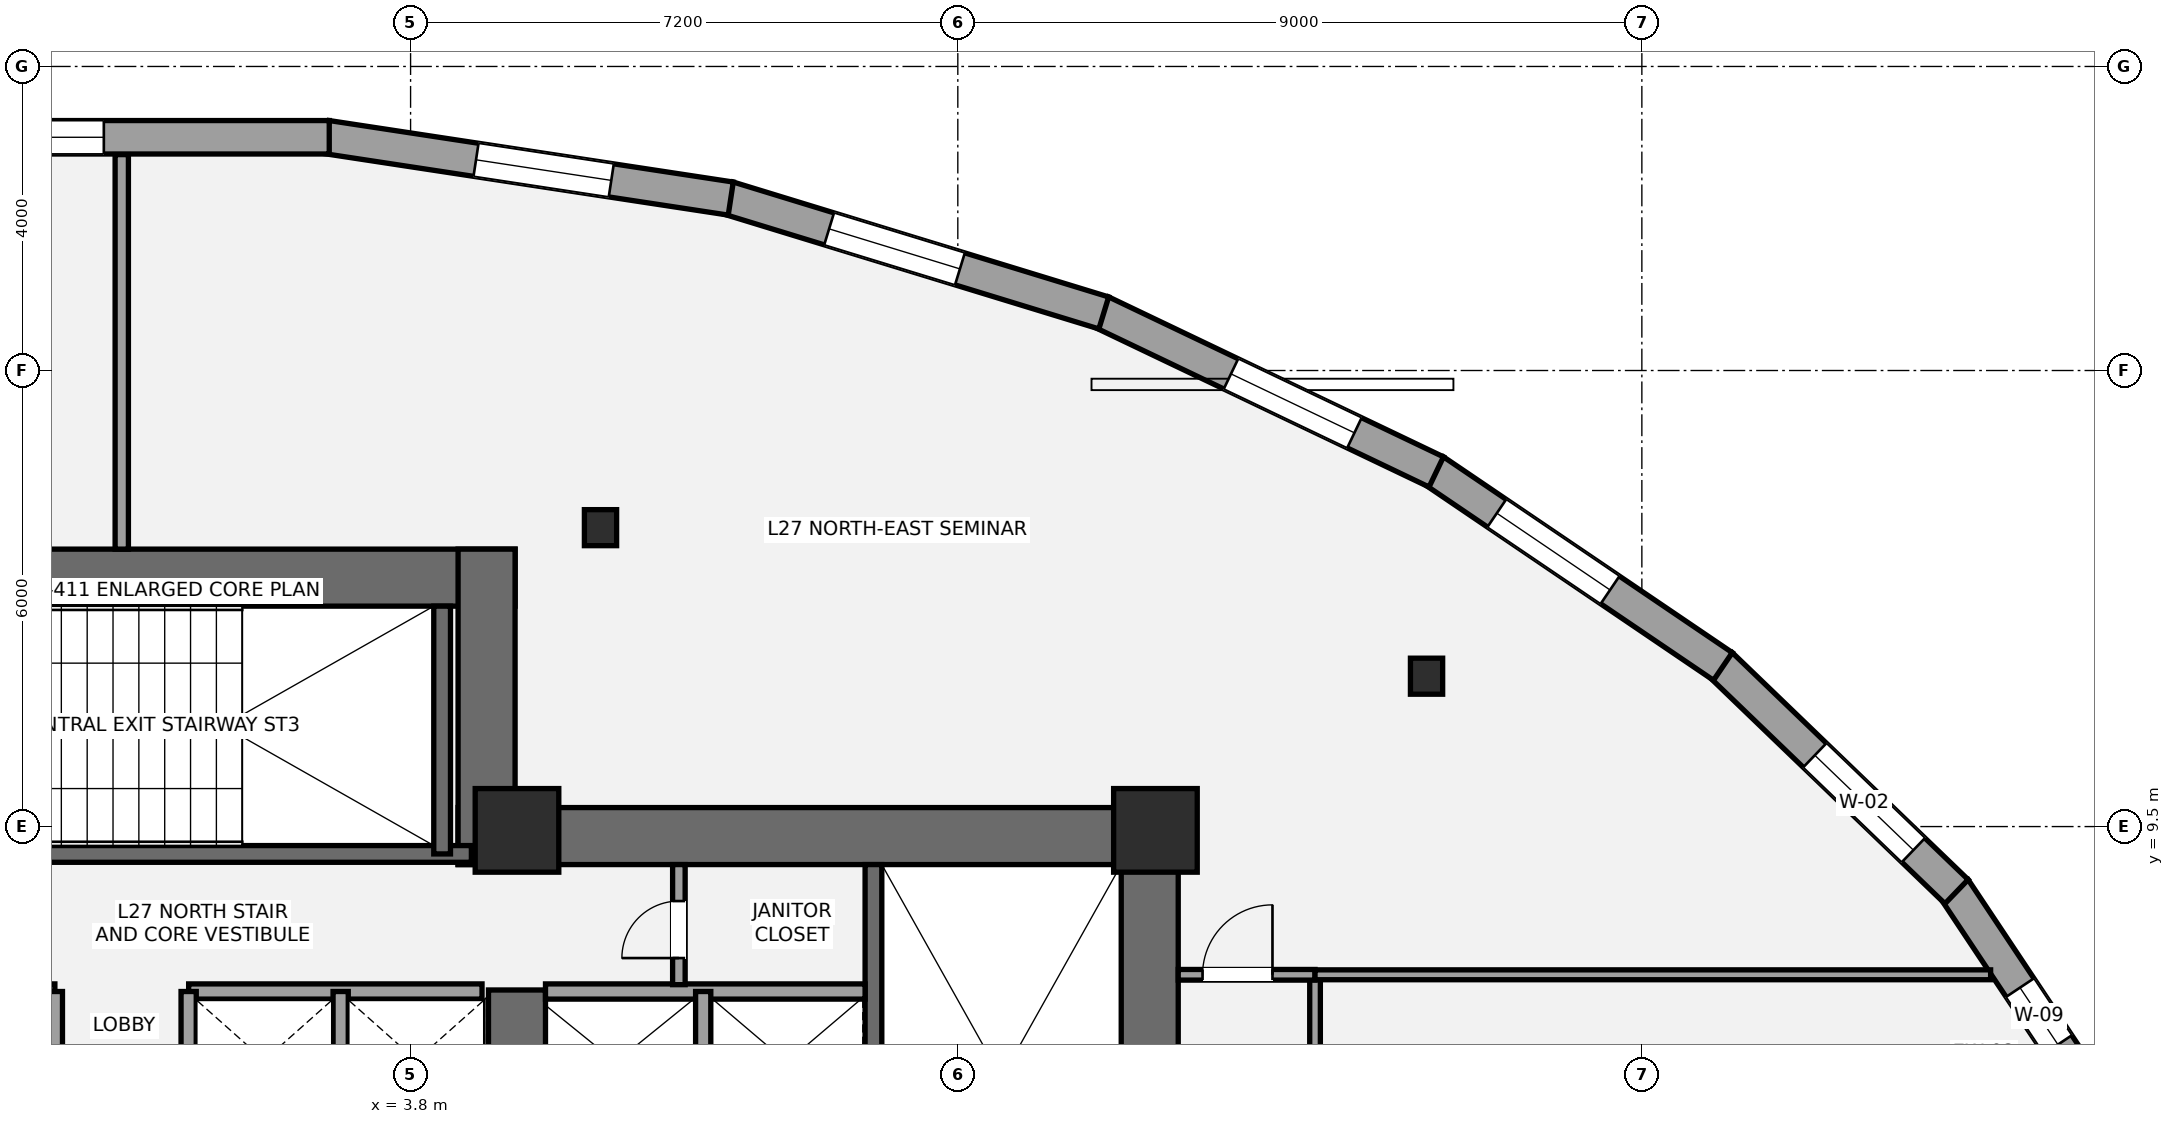
"""IFC4 building model, lengths in metres.
Left out: names, types, materials, properties, quantities, classifications, styles, units other than length and angle.
Written with IfcOpenShell. Run it as: python <this file> out.ifc"""

import sys

from ifc_helpers import new_model, si_unit, direction, frame, frame_2d, origin, origin_2d, place, context, subcontext, project, spatial, rectangle, i_section, extrude, element, fill, save


model = new_model("IFC4")
c1 = context("Model", 3, precision=1e-05, world=origin(), true_north=direction((0.0, 1.0)))
c2 = subcontext(c1, "Body", "Model", "MODEL_VIEW")
j1 = project(units=[si_unit("LENGTHUNIT", "METRE"), si_unit("PLANEANGLEUNIT", "RADIAN")], contexts=[c1])
p1 = place(None, origin())
s1 = spatial("IfcSite", under=j1, at=p1, CompositionType="ELEMENT")
p2 = place(p1, origin())
s2 = spatial("IfcBuilding", under=s1, at=p2, CompositionType="ELEMENT")
p3 = place(p2, frame((0.0, 0.0, 103.6)))
s3 = spatial("IfcBuildingStorey", under=s2, at=p3, CompositionType="ELEMENT", Elevation=103.6)
p4 = place(p3, frame((13.525, 1.1, 0.0), z_axis=(0.0, 0.0, 1.0), x_axis=(0.0, 1.0, 0.0)))
e1 = element("IfcWall", 1, at=p4, inside=s3, PredefinedType="SHEAR", context=c2, shape_type="SweptSolid", body=[
    extrude(rectangle(XDim=8.65, YDim=0.75, at=frame_2d((4.325, 0.0))), origin(), (0.0, 0.0, 1.0), 3.5),
])
p5 = place(p3, frame((4.425, 9.375, 0.0), z_axis=(0.0, 0.0, 1.0), x_axis=(1.0, 0.0, 0.0)))
e2 = element("IfcWall", 2, at=p5, inside=s3, PredefinedType="SHEAR", context=c2, shape_type="SweptSolid", body=[
    extrude(rectangle(XDim=9.475, YDim=0.75, at=frame_2d((4.737, 0.0))), origin(), (0.0, 0.0, 1.0), 3.5),
])
p6 = place(p3, frame((5.2, 5.35, 0.0), z_axis=(0.0, 0.0, 1.0), x_axis=(0.0, 1.0, 0.0)))
e3 = element("IfcWall", 3, at=p6, inside=s3, PredefinedType="SHEAR", context=c2, shape_type="SweptSolid", body=[
    extrude(rectangle(XDim=2.0, YDim=0.75, at=frame_2d((1.0, 0.0))), origin(), (0.0, 0.0, 1.0), 3.5),
])
p7 = place(p3, frame((9.89, 1.85, 0.0), z_axis=(0.0, 0.0, 1.0), x_axis=(0.0, 1.0, 0.0)))
e4 = element("IfcWall", 4, at=p7, inside=s3, PredefinedType="SHEAR", context=c2, shape_type="SweptSolid", body=[
    extrude(rectangle(XDim=7.15, YDim=0.22, at=frame_2d((3.575, 0.0))), origin(), (0.0, 0.0, 1.0), 3.5),
])
p8 = place(p3, frame((-5.175, 12.775, 0.0), z_axis=(0.0, 0.0, 1.0), x_axis=(1.0, 0.0, 0.0)))
e5 = element("IfcWall", 5, at=p8, inside=s3, PredefinedType="SHEAR", context=c2, shape_type="SweptSolid", body=[
    extrude(rectangle(XDim=10.35, YDim=0.75, at=frame_2d((5.175, 0.0))), origin(), (0.0, 0.0, 1.0), 3.5),
])
p9 = place(p3, frame((4.8, 9.0, 0.0), z_axis=(0.0, 0.0, 1.0), x_axis=(0.0, 1.0, 0.0)))
e6 = element("IfcWall", 6, at=p9, inside=s3, PredefinedType="SHEAR", context=c2, shape_type="SweptSolid", body=[
    extrude(rectangle(XDim=4.15, YDim=0.75, at=frame_2d((2.075, 0.0))), origin(), (0.0, 0.0, 1.0), 3.5),
])
p10 = place(p3, frame((-4.7, 9.14, 0.0), z_axis=(0.0, 0.0, 1.0), x_axis=(1.0, 0.0, 0.0)))
e7 = element("IfcWall", 7, at=p10, inside=s3, PredefinedType="SHEAR", context=c2, shape_type="SweptSolid", body=[
    extrude(rectangle(XDim=9.3, YDim=0.22, at=frame_2d((4.65, 0.0))), origin(), (0.0, 0.0, 1.0), 3.5),
])
p11 = place(p10, frame((1.15, 0.0, 0.0)))
e8 = element("IfcOpeningElement", 8, at=p11, cuts=e7, PredefinedType="OPENING", context=c2, shape_type="SweptSolid", body=[
    extrude(rectangle(XDim=1.05, YDim=2.15, at=frame_2d((0.525, 1.075))), frame((0.0, 0.12, 0.0), z_axis=(0.0, -1.0, 0.0), x_axis=(1.0, 0.0, 0.0)), (0.0, 0.0, 1.0), 0.24),
])
p12 = place(p3, frame((4.215, 9.14, 0.0), z_axis=(0.0, 0.0, 1.0), x_axis=(0.0, 1.0, 0.0)))
e9 = element("IfcWall", 9, at=p12, inside=s3, PredefinedType="SHEAR", context=c2, shape_type="SweptSolid", body=[
    extrude(rectangle(XDim=3.26, YDim=0.22, at=frame_2d((1.63, 0.0))), origin(), (0.0, 0.0, 1.0), 3.5),
])
for number, where, z_axis, x_axis in (
    (10, (5.2, 9.45, 0.0), (0.0, 0.0, 1.0), (1.0, 0.0, 0.0)),
    (11, (13.6, 9.45, 0.0), (0.0, 0.0, 1.0), (1.0, 0.0, 0.0)),
):
    element("IfcColumn", number, at=place(p3, frame(where, z_axis=z_axis, x_axis=x_axis)), inside=s3, PredefinedType="COLUMN", context=c2, shape_type="SweptSolid", body=[
        extrude(rectangle(XDim=1.1, YDim=1.1, at=origin_2d()), origin(), (0.0, 0.0, 1.0), 3.5),
    ])
for number, where, z_axis, x_axis in (
    (12, (17.167, 11.478, 0.0), (0.0, 0.0, 1.0), (1.0, 0.0, 0.0)),
    (13, (6.299, 13.433, 0.0), (0.0, 0.0, 1.0), (1.0, 0.0, 0.0)),
):
    element("IfcColumn", number, at=place(p3, frame(where, z_axis=z_axis, x_axis=x_axis)), inside=s3, PredefinedType="COLUMN", context=c2, shape_type="SweptSolid", body=[
        extrude(i_section(OverallWidth=0.424, OverallDepth=0.474, WebThickness=0.048, FlangeThickness=0.077, at=origin_2d()), origin(), (0.0, 0.0, 1.0), 3.5),
    ])
p13 = place(p3, frame((24.11, 8.68, 0.0), z_axis=(0.0, 0.0, 1.0), x_axis=(0.554293965046, -0.83232097193, 0.0)))
e14 = element("IfcWall", 14, at=p13, inside=s3, PredefinedType="STANDARD", context=c2, shape_type="SweptSolid", body=[
    extrude(rectangle(XDim=4.023, YDim=0.44, at=frame_2d((2.011, 0.0))), origin(), (0.0, 0.0, 1.0), 2.528),
])
p14 = place(p13, frame((1.561, 0.0, 0.58)))
e15 = element("IfcOpeningElement", 15, at=p14, cuts=e14, PredefinedType="OPENING", context=c2, shape_type="SweptSolid", body=[
    extrude(rectangle(XDim=0.9, YDim=1.35, at=frame_2d((0.45, 0.675))), frame((0.0, 0.23, 0.0), z_axis=(0.0, -1.0, 0.0), x_axis=(1.0, 0.0, 0.0)), (0.0, 0.0, 1.0), 0.46),
])
p15 = place(p3, frame((21.037, 11.63, 0.0), z_axis=(0.0, 0.0, 1.0), x_axis=(0.720581378362, -0.693370375166, 0.0)))
e16 = element("IfcWall", 16, at=p15, inside=s3, PredefinedType="STANDARD", context=c2, shape_type="SweptSolid", body=[
    extrude(rectangle(XDim=4.307, YDim=0.44, at=frame_2d((2.153, 0.0))), origin(), (0.0, 0.0, 1.0), 2.528),
])
p16 = place(p15, frame((1.719, 0.0, 0.65)))
e17 = element("IfcOpeningElement", 17, at=p16, cuts=e16, PredefinedType="OPENING", context=c2, shape_type="SweptSolid", body=[
    extrude(rectangle(XDim=1.8, YDim=1.7, at=frame_2d((0.9, 0.85))), frame((0.0, 0.23, 0.0), z_axis=(0.0, -1.0, 0.0), x_axis=(1.0, 0.0, 0.0)), (0.0, 0.0, 1.0), 0.46),
])
p17 = place(p3, frame((17.266, 14.182, 0.0), z_axis=(0.0, 0.0, 1.0), x_axis=(0.827754551165, -0.56109036975, 0.0)))
e18 = element("IfcWall", 18, at=p17, inside=s3, PredefinedType="STANDARD", context=c2, shape_type="SweptSolid", body=[
    extrude(rectangle(XDim=4.591, YDim=0.44, at=frame_2d((2.295, 0.0))), origin(), (0.0, 0.0, 1.0), 2.528),
])
p18 = place(p17, frame((0.997, 0.0, 0.65)))
e19 = element("IfcOpeningElement", 19, at=p18, cuts=e18, PredefinedType="OPENING", context=c2, shape_type="SweptSolid", body=[
    extrude(rectangle(XDim=1.8, YDim=1.7, at=frame_2d((0.9, 0.85))), frame((0.0, 0.23, 0.0), z_axis=(0.0, -1.0, 0.0), x_axis=(1.0, 0.0, 0.0)), (0.0, 0.0, 1.0), 0.46),
])
p19 = place(p3, frame((12.89, 16.27, 0.0), z_axis=(0.0, 0.0, 1.0), x_axis=(0.902372757907, -0.430956385018, 0.0)))
e20 = element("IfcWall", 20, at=p19, inside=s3, PredefinedType="STANDARD", context=c2, shape_type="SweptSolid", body=[
    extrude(rectangle(XDim=4.882, YDim=0.44, at=frame_2d((2.441, 0.0))), origin(), (0.0, 0.0, 1.0), 2.528),
])
p20 = place(p19, frame((1.888, 0.0, 0.65)))
e21 = element("IfcOpeningElement", 21, at=p20, cuts=e20, PredefinedType="OPENING", context=c2, shape_type="SweptSolid", body=[
    extrude(rectangle(XDim=1.8, YDim=1.7, at=frame_2d((0.9, 0.85))), frame((0.0, 0.23, 0.0), z_axis=(0.0, -1.0, 0.0), x_axis=(1.0, 0.0, 0.0)), (0.0, 0.0, 1.0), 0.46),
])
p21 = place(p3, frame((7.981, 17.769, 0.0), z_axis=(0.0, 0.0, 1.0), x_axis=(0.956228569431, -0.292620783617, 0.0)))
e22 = element("IfcWall", 22, at=p21, inside=s3, PredefinedType="STANDARD", context=c2, shape_type="SweptSolid", body=[
    extrude(rectangle(XDim=5.165, YDim=0.44, at=frame_2d((2.583, 0.0))), origin(), (0.0, 0.0, 1.0), 2.528),
])
p22 = place(p21, frame((1.386, 0.0, 0.65)))
e23 = element("IfcOpeningElement", 23, at=p22, cuts=e22, PredefinedType="OPENING", context=c2, shape_type="SweptSolid", body=[
    extrude(rectangle(XDim=1.8, YDim=1.7, at=frame_2d((0.9, 0.85))), frame((0.0, 0.23, 0.0), z_axis=(0.0, -1.0, 0.0), x_axis=(1.0, 0.0, 0.0)), (0.0, 0.0, 1.0), 0.46),
])
p23 = place(p3, frame((2.697, 18.571, 0.0), z_axis=(0.0, 0.0, 1.0), x_axis=(0.988627497469, -0.150385076545, 0.0)))
e24 = element("IfcWall", 24, at=p23, inside=s3, PredefinedType="STANDARD", context=c2, shape_type="SweptSolid", body=[
    extrude(rectangle(XDim=5.377, YDim=0.44, at=frame_2d((2.688, 0.0))), origin(), (0.0, 0.0, 1.0), 2.528),
])
p24 = place(p23, frame((1.987, 0.0, 0.65)))
e25 = element("IfcOpeningElement", 25, at=p24, cuts=e24, PredefinedType="OPENING", context=c2, shape_type="SweptSolid", body=[
    extrude(rectangle(XDim=1.8, YDim=1.7, at=frame_2d((0.9, 0.85))), frame((0.0, 0.23, 0.0), z_axis=(0.0, -1.0, 0.0), x_axis=(1.0, 0.0, 0.0)), (0.0, 0.0, 1.0), 0.46),
])
p25 = place(p3, frame((-2.73, 18.568, 0.0), z_axis=(0.0, 0.0, 1.0), x_axis=(1.0, 0.0, 0.0)))
e26 = element("IfcWall", 26, at=p25, inside=s3, PredefinedType="STANDARD", context=c2, shape_type="SweptSolid", body=[
    extrude(rectangle(XDim=5.459, YDim=0.44, at=frame_2d((2.73, 0.0))), origin(), (0.0, 0.0, 1.0), 2.528),
])
p26 = place(p25, frame((0.694, 0.0, 0.65)))
e27 = element("IfcOpeningElement", 27, at=p26, cuts=e26, PredefinedType="OPENING", context=c2, shape_type="SweptSolid", body=[
    extrude(rectangle(XDim=1.8, YDim=1.7, at=frame_2d((0.9, 0.85))), frame((0.0, 0.23, 0.0), z_axis=(0.0, -1.0, 0.0), x_axis=(1.0, 0.0, 0.0)), (0.0, 0.0, 1.0), 0.46),
])
p27 = place(p3, frame((5.575, 7.33, 0.0), z_axis=(0.0, 0.0, 1.0), x_axis=(1.0, 0.0, 0.0)))
e28 = element("IfcWall", 28, at=p27, inside=s3, PredefinedType="SOLIDWALL", context=c2, shape_type="SweptSolid", body=[
    extrude(rectangle(XDim=4.205, YDim=0.2, at=frame_2d((2.103, 0.0))), origin(), (0.0, 0.0, 1.0), 3.31),
])
p28 = place(p3, frame((7.65, 5.47, 0.0), z_axis=(0.0, 0.0, 1.0), x_axis=(0.0, 1.0, 0.0)))
e29 = element("IfcWall", 29, at=p28, inside=s3, PredefinedType="SOLIDWALL", context=c2, shape_type="SweptSolid", body=[
    extrude(rectangle(XDim=1.86, YDim=0.2, at=frame_2d((0.93, 0.0))), origin(), (0.0, 0.0, 1.0), 3.31),
])
for number, where, z_axis, x_axis in (
    (30, (-4.74, 7.33, 0.0), (0.0, 0.0, 1.0), (1.0, 0.0, 0.0)),
    (31, (0.88, 7.33, 0.0), (0.0, 0.0, 1.0), (1.0, 0.0, 0.0)),
):
    element("IfcWall", number, at=place(p3, frame(where, z_axis=z_axis, x_axis=x_axis)), inside=s3, PredefinedType="SOLIDWALL", context=c2, shape_type="SweptSolid", body=[
        extrude(rectangle(XDim=3.86, YDim=0.2, at=frame_2d((1.93, 0.0))), origin(), (0.0, 0.0, 1.0), 3.31),
    ])
for number, where, z_axis, x_axis in (
    (32, (2.88, 5.52, 0.0), (0.0, 0.0, 1.0), (0.0, 1.0, 0.0)),
    (33, (-0.88, 5.52, 0.0), (0.0, 0.0, 1.0), (0.0, 1.0, 0.0)),
    (34, (0.88, 5.52, 0.0), (0.0, 0.0, 1.0), (0.0, 1.0, 0.0)),
):
    element("IfcWall", number, at=place(p3, frame(where, z_axis=z_axis, x_axis=x_axis)), inside=s3, PredefinedType="SOLIDWALL", context=c2, shape_type="SweptSolid", body=[
        extrude(rectangle(XDim=1.81, YDim=0.2, at=frame_2d((0.905, 0.0))), origin(), (0.0, 0.0, 1.0), 3.31),
    ])
p29 = place(p3, frame((7.33, 7.42, 0.0), z_axis=(0.0, 0.0, 1.0), x_axis=(0.0, 1.0, 0.0)))
e35 = element("IfcWall", 35, at=p29, inside=s3, PredefinedType="PARTITIONING", context=c2, shape_type="SweptSolid", body=[
    extrude(rectangle(XDim=1.58, YDim=0.165, at=frame_2d((0.79, 0.0))), origin(), (0.0, 0.0, 1.0), 3.31),
])
p30 = place(p29, frame((0.35, 0.0, 0.0)))
e36 = element("IfcOpeningElement", 36, at=p30, cuts=e35, PredefinedType="OPENING", context=c2, shape_type="SweptSolid", body=[
    extrude(rectangle(XDim=0.75, YDim=2.1, at=frame_2d((0.375, 1.05))), frame((0.0, 0.093, 0.0), z_axis=(0.0, -1.0, 0.0), x_axis=(1.0, 0.0, 0.0)), (0.0, 0.0, 1.0), 0.185),
])
p31 = place(p3, frame((15.7, -14.675, 0.0), z_axis=(0.0, 0.0, 1.0), x_axis=(0.0, 1.0, 0.0)))
e37 = element("IfcWall", 37, at=p31, inside=s3, PredefinedType="PARTITIONING", context=c2, shape_type="SweptSolid", body=[
    extrude(rectangle(XDim=22.225, YDim=0.14, at=frame_2d((11.112, 0.0))), origin(), (0.0, 0.0, 1.0), 2.763),
])
p32 = place(p31, frame((9.325, 0.0, 0.0)))
e38 = element("IfcOpeningElement", 38, at=p32, cuts=e37, PredefinedType="OPENING", context=c2, shape_type="SweptSolid", body=[
    extrude(rectangle(XDim=0.9, YDim=2.1, at=frame_2d((0.45, 1.05))), frame((0.0, 0.08, 0.0), z_axis=(0.0, -1.0, 0.0), x_axis=(1.0, 0.0, 0.0)), (0.0, 0.0, 1.0), 0.16),
])
p33 = place(p31, frame((13.525, 0.0, 0.0)))
e39 = element("IfcOpeningElement", 39, at=p33, cuts=e37, PredefinedType="OPENING", context=c2, shape_type="SweptSolid", body=[
    extrude(rectangle(XDim=0.9, YDim=2.1, at=frame_2d((0.45, 1.05))), frame((0.0, 0.08, 0.0), z_axis=(0.0, -1.0, 0.0), x_axis=(1.0, 0.0, 0.0)), (0.0, 0.0, 1.0), 0.16),
])
p34 = place(p31, frame((16.925, 0.0, 0.0)))
e40 = element("IfcOpeningElement", 40, at=p34, cuts=e37, PredefinedType="OPENING", context=c2, shape_type="SweptSolid", body=[
    extrude(rectangle(XDim=0.9, YDim=2.1, at=frame_2d((0.45, 1.05))), frame((0.0, 0.08, 0.0), z_axis=(0.0, -1.0, 0.0), x_axis=(1.0, 0.0, 0.0)), (0.0, 0.0, 1.0), 0.16),
])
p35 = place(p31, frame((20.2, 0.0, 0.0)))
e41 = element("IfcOpeningElement", 41, at=p35, cuts=e37, PredefinedType="OPENING", context=c2, shape_type="SweptSolid", body=[
    extrude(rectangle(XDim=0.9, YDim=2.1, at=frame_2d((0.45, 1.05))), frame((0.0, 0.08, 0.0), z_axis=(0.0, -1.0, 0.0), x_axis=(1.0, 0.0, 0.0)), (0.0, 0.0, 1.0), 0.16),
])
p36 = place(p3, frame((13.9, 7.55, 0.0), z_axis=(0.0, 0.0, 1.0), x_axis=(1.0, 0.0, 0.0)))
e42 = element("IfcWall", 42, at=p36, inside=s3, PredefinedType="PARTITIONING", context=c2, shape_type="SweptSolid", body=[
    extrude(rectangle(XDim=1.8, YDim=0.14, at=frame_2d((0.9, 0.0))), origin(), (0.0, 0.0, 1.0), 2.763),
])
p37 = place(p36, frame((0.32, 0.0, 0.0)))
e43 = element("IfcOpeningElement", 43, at=p37, cuts=e42, PredefinedType="OPENING", context=c2, shape_type="SweptSolid", body=[
    extrude(rectangle(XDim=0.92, YDim=2.15, at=frame_2d((0.46, 1.075))), frame((0.0, 0.08, 0.0), z_axis=(0.0, -1.0, 0.0), x_axis=(1.0, 0.0, 0.0)), (0.0, 0.0, 1.0), 0.16),
])
p38 = place(p3, frame((0.0, 13.15, 0.0), z_axis=(0.0, 0.0, 1.0), x_axis=(0.0, 1.0, 0.0)))
e44 = element("IfcWall", 44, at=p38, inside=s3, PredefinedType="PARTITIONING", context=c2, shape_type="SweptSolid", body=[
    extrude(rectangle(XDim=5.19, YDim=0.175, at=frame_2d((2.595, 0.0))), origin(), (0.0, 0.0, 1.0), 3.31),
])
p39 = place(p3, frame((15.7, 7.55, 0.0), z_axis=(0.0, 0.0, 1.0), x_axis=(1.0, 0.0, 0.0)))
e45 = element("IfcWall", 45, at=p39, inside=s3, PredefinedType="PARTITIONING", context=c2, shape_type="SweptSolid", body=[
    extrude(rectangle(XDim=8.889, YDim=0.13, at=frame_2d((4.444, 0.0))), origin(), (0.0, 0.0, 1.0), 2.763),
])
p40 = place(p14, origin())
e46 = element("IfcWindow", 46, at=p40, inside=s3, PartitioningType="SINGLE_PANEL", PredefinedType="WINDOW", context=c2, shape_type="SweptSolid", body=[
    extrude(rectangle(XDim=0.9, YDim=1.35, at=frame_2d((0.45, 0.675))), frame((0.0, -0.01, 0.0), z_axis=(0.0, -1.0, 0.0), x_axis=(1.0, 0.0, 0.0)), (0.0, 0.0, 1.0), 0.06),
])
fill(e15, e46)
p41 = place(p16, origin())
e47 = element("IfcWindow", 47, at=p41, inside=s3, PartitioningType="SINGLE_PANEL", PredefinedType="WINDOW", context=c2, shape_type="SweptSolid", body=[
    extrude(rectangle(XDim=1.8, YDim=1.7, at=frame_2d((0.9, 0.85))), frame((0.0, -0.01, 0.0), z_axis=(0.0, -1.0, 0.0), x_axis=(1.0, 0.0, 0.0)), (0.0, 0.0, 1.0), 0.06),
])
fill(e17, e47)
p42 = place(p18, origin())
e48 = element("IfcWindow", 48, at=p42, inside=s3, PartitioningType="SINGLE_PANEL", PredefinedType="WINDOW", context=c2, shape_type="SweptSolid", body=[
    extrude(rectangle(XDim=1.8, YDim=1.7, at=frame_2d((0.9, 0.85))), frame((0.0, -0.01, 0.0), z_axis=(0.0, -1.0, 0.0), x_axis=(1.0, 0.0, 0.0)), (0.0, 0.0, 1.0), 0.06),
])
fill(e19, e48)
p43 = place(p20, origin())
e49 = element("IfcWindow", 49, at=p43, inside=s3, PartitioningType="SINGLE_PANEL", PredefinedType="WINDOW", context=c2, shape_type="SweptSolid", body=[
    extrude(rectangle(XDim=1.8, YDim=1.7, at=frame_2d((0.9, 0.85))), frame((0.0, -0.01, 0.0), z_axis=(0.0, -1.0, 0.0), x_axis=(1.0, 0.0, 0.0)), (0.0, 0.0, 1.0), 0.06),
])
fill(e21, e49)
p44 = place(p22, origin())
e50 = element("IfcWindow", 50, at=p44, inside=s3, PartitioningType="SINGLE_PANEL", PredefinedType="WINDOW", context=c2, shape_type="SweptSolid", body=[
    extrude(rectangle(XDim=1.8, YDim=1.7, at=frame_2d((0.9, 0.85))), frame((0.0, -0.01, 0.0), z_axis=(0.0, -1.0, 0.0), x_axis=(1.0, 0.0, 0.0)), (0.0, 0.0, 1.0), 0.06),
])
fill(e23, e50)
p45 = place(p24, origin())
e51 = element("IfcWindow", 51, at=p45, inside=s3, PartitioningType="SINGLE_PANEL", PredefinedType="WINDOW", context=c2, shape_type="SweptSolid", body=[
    extrude(rectangle(XDim=1.8, YDim=1.7, at=frame_2d((0.9, 0.85))), frame((0.0, -0.01, 0.0), z_axis=(0.0, -1.0, 0.0), x_axis=(1.0, 0.0, 0.0)), (0.0, 0.0, 1.0), 0.06),
])
fill(e25, e51)
p46 = place(p26, origin())
e52 = element("IfcWindow", 52, at=p46, inside=s3, PartitioningType="SINGLE_PANEL", PredefinedType="WINDOW", context=c2, shape_type="SweptSolid", body=[
    extrude(rectangle(XDim=1.8, YDim=1.7, at=frame_2d((0.9, 0.85))), frame((0.0, -0.01, 0.0), z_axis=(0.0, -1.0, 0.0), x_axis=(1.0, 0.0, 0.0)), (0.0, 0.0, 1.0), 0.06),
])
fill(e27, e52)
p47 = place(p30, origin())
e53 = element("IfcDoor", 53, at=p47, inside=s3, OperationType="SINGLE_SWING_LEFT", PredefinedType="DOOR", context=c2, shape_type="SweptSolid", body=[
    extrude(rectangle(XDim=0.75, YDim=2.1, at=frame_2d((0.375, 1.05))), frame((0.0, 0.025, 0.0), z_axis=(0.0, -1.0, 0.0), x_axis=(1.0, 0.0, 0.0)), (0.0, 0.0, 1.0), 0.05),
])
fill(e36, e53)
p48 = place(p37, origin())
e54 = element("IfcDoor", 54, at=p48, inside=s3, OperationType="SINGLE_SWING_RIGHT", PredefinedType="DOOR", context=c2, shape_type="SweptSolid", body=[
    extrude(rectangle(XDim=0.92, YDim=2.15, at=frame_2d((0.46, 1.075))), frame((0.0, 0.025, 0.0), z_axis=(0.0, -1.0, 0.0), x_axis=(1.0, 0.0, 0.0)), (0.0, 0.0, 1.0), 0.05),
])
fill(e43, e54)
save(model, sys.argv[1])
